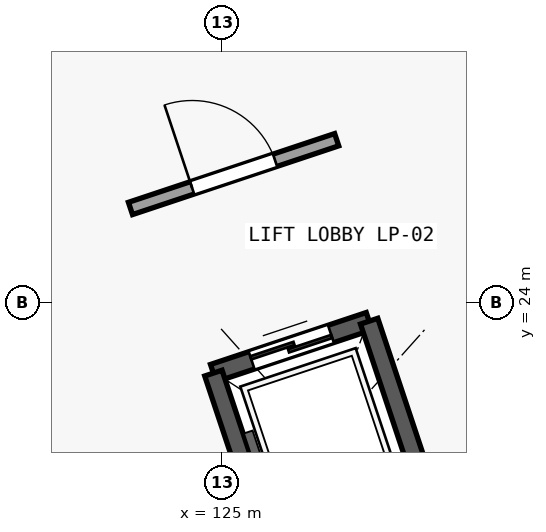
"""IFC4 building model, lengths in metres.
Left out: names, types, materials, properties, quantities, classifications, styles, units other than length and angle.
Written with IfcOpenShell. Run it as: python <this file> out.ifc"""

import sys

from ifc_helpers import new_model, si_unit, direction, frame, frame_2d, origin, place, context, subcontext, project, spatial, rectangle, extrude, element, fill, save


model = new_model("IFC4")
c1 = context("Model", 3, precision=1e-05, world=origin(), true_north=direction((0.0, 1.0)))
c2 = subcontext(c1, "Body", "Model", "MODEL_VIEW")
j1 = project(units=[si_unit("LENGTHUNIT", "METRE"), si_unit("PLANEANGLEUNIT", "RADIAN")], contexts=[c1])
p1 = place(None, origin())
s1 = spatial("IfcSite", under=j1, at=p1, CompositionType="ELEMENT")
p2 = place(p1, origin())
s2 = spatial("IfcBuilding", under=s1, at=p2, CompositionType="ELEMENT")
p3 = place(p2, frame((0.0, 0.0, 5.4)))
s3 = spatial("IfcBuildingStorey", under=s2, at=p3, CompositionType="ELEMENT", Elevation=5.4)
p4 = place(p3, frame((124.888, 23.071, 0.0), z_axis=(0.0, 0.0, 1.0), x_axis=(0.948683298051, 0.316227766017, 0.0)))
e1 = element("IfcWall", 1, at=p4, inside=s3, PredefinedType="SOLIDWALL", context=c2, shape_type="SweptSolid", body=[
    extrude(rectangle(XDim=2.16, YDim=0.24, at=frame_2d((1.08, 0.0))), origin(), (0.0, 0.0, 1.0), 3.64),
])
p5 = place(p4, frame((0.53, 0.0, 0.0)))
e2 = element("IfcOpeningElement", 2, at=p5, cuts=e1, PredefinedType="OPENING", context=c2, shape_type="SweptSolid", body=[
    extrude(rectangle(XDim=1.1, YDim=2.15, at=frame_2d((0.55, 1.075))), frame((0.0, 0.13, 0.0), z_axis=(0.0, -1.0, 0.0), x_axis=(1.0, 0.0, 0.0)), (0.0, 0.0, 1.0), 0.26),
])
for number, where, z_axis, x_axis in (
    (3, (125.729, 20.548, 0.0), (0.0, 0.0, 1.0), (-0.316, 0.949, 0.0)),
    (4, (126.938, 23.754, 0.0), (0.0, 0.0, 1.0), (0.316, -0.949, 0.0)),
):
    element("IfcWall", number, at=place(p3, frame(where, z_axis=z_axis, x_axis=x_axis)), inside=s3, PredefinedType="SOLIDWALL", context=c2, shape_type="SweptSolid", body=[
        extrude(rectangle(XDim=2.66, YDim=0.24, at=frame_2d((1.33, 0.0))), origin(), (0.0, 0.0, 1.0), 3.64),
    ])
p6 = place(p3, frame((123.797, 25.237, 0.0), z_axis=(0.0, 0.0, 1.0), x_axis=(0.94869183448, 0.316202155576, 0.0)))
e5 = element("IfcWall", 5, at=p6, inside=s3, PredefinedType="PARTITIONING", context=c2, shape_type="SweptSolid", body=[
    extrude(rectangle(XDim=2.86, YDim=0.17, at=frame_2d((1.43, 0.0))), origin(), (0.0, 0.0, 1.0), 3.64),
])
p7 = place(p6, frame((0.855, 0.0, 0.0)))
e6 = element("IfcOpeningElement", 6, at=p7, cuts=e5, PredefinedType="OPENING", context=c2, shape_type="SweptSolid", body=[
    extrude(rectangle(XDim=1.15, YDim=2.15, at=frame_2d((0.575, 1.075))), frame((0.0, 0.095, 0.0), z_axis=(0.0, -1.0, 0.0), x_axis=(1.0, 0.0, 0.0)), (0.0, 0.0, 1.0), 0.19),
])
p8 = place(p3, frame((102.61, 23.751, 0.0), z_axis=(0.0, 0.0, 1.0), x_axis=(0.948683298051, 0.316227766017, 0.0)))
e7 = element("IfcWall", 7, at=p8, inside=s3, PredefinedType="PARTITIONING", context=c2, shape_type="SweptSolid", body=[
    extrude(rectangle(XDim=35.5, YDim=0.16, at=frame_2d((17.75, 0.0))), origin(), (0.0, 0.0, 1.0), 3.64),
])
p9 = place(p8, frame((11.713, 0.0, 0.0)))
e8 = element("IfcOpeningElement", 8, at=p9, cuts=e7, PredefinedType="OPENING", context=c2, shape_type="SweptSolid", body=[
    extrude(rectangle(XDim=1.05, YDim=2.15, at=frame_2d((0.525, 1.075))), frame((0.0, 0.09, 0.0), z_axis=(0.0, -1.0, 0.0), x_axis=(1.0, 0.0, 0.0)), (0.0, 0.0, 1.0), 0.18),
])
p10 = place(p5, origin())
e9 = element("IfcDoor", 9, at=p10, inside=s3, OperationType="DOUBLE_DOOR_SLIDING", PredefinedType="DOOR", context=c2, shape_type="SweptSolid", body=[
    extrude(rectangle(XDim=1.1, YDim=2.15, at=frame_2d((0.55, 1.075))), frame((0.0, 0.025, 0.0), z_axis=(0.0, -1.0, 0.0), x_axis=(1.0, 0.0, 0.0)), (0.0, 0.0, 1.0), 0.05),
])
fill(e2, e9)
p11 = place(p7, origin())
e10 = element("IfcDoor", 10, at=p11, inside=s3, OperationType="SINGLE_SWING_LEFT", PredefinedType="DOOR", context=c2, shape_type="SweptSolid", body=[
    extrude(rectangle(XDim=1.15, YDim=2.15, at=frame_2d((0.575, 1.075))), frame((0.0, 0.025, 0.0), z_axis=(0.0, -1.0, 0.0), x_axis=(1.0, 0.0, 0.0)), (0.0, 0.0, 1.0), 0.05),
])
fill(e6, e10)
save(model, sys.argv[1])
